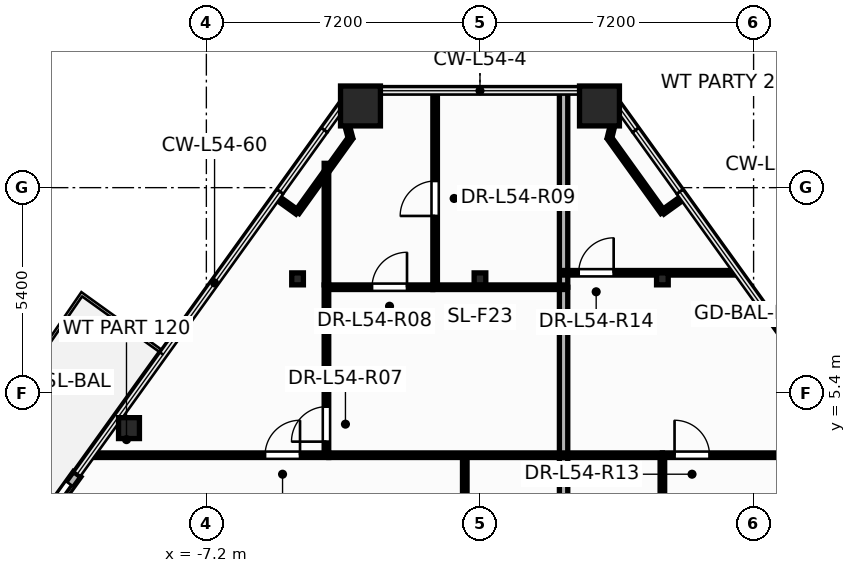
"""IFC4 building model, lengths in metres.
Left out: names, types, materials, properties, quantities, classifications, styles, units other than length and angle.
Written with IfcOpenShell. Run it as: python <this file> out.ifc"""

import sys

from ifc_helpers import new_model, si_unit, direction, frame, frame_2d, origin, origin_2d, place, context, subcontext, project, spatial, rectangle, hollow_rectangle, hollow_circle, i_section, extrude, element, fill, save


model = new_model("IFC4")
c1 = context("Model", 3, precision=1e-05, world=origin(), true_north=direction((0.0, 1.0)))
c2 = subcontext(c1, "Body", "Model", "MODEL_VIEW")
j1 = project(units=[si_unit("LENGTHUNIT", "METRE"), si_unit("PLANEANGLEUNIT", "RADIAN")], contexts=[c1])
p1 = place(None, origin())
s1 = spatial("IfcSite", under=j1, at=p1, CompositionType="ELEMENT")
p2 = place(p1, origin())
s2 = spatial("IfcBuilding", under=s1, at=p2, CompositionType="ELEMENT")
p3 = place(p2, frame((0.0, 0.0, 207.3)))
s3 = spatial("IfcBuildingStorey", under=s2, at=p3, CompositionType="ELEMENT", Elevation=207.3)
for number, where, z_axis, x_axis in (
    (1, (3.145, 12.95, 0.0), (0.0, 0.0, 1.0), (1.0, 0.0, 0.0)),
    (2, (-3.145, 12.95, 0.0), (0.0, 0.0, 1.0), (1.0, 0.0, 0.0)),
):
    element("IfcColumn", number, at=place(p3, frame(where, z_axis=z_axis, x_axis=x_axis)), inside=s3, PredefinedType="COLUMN", context=c2, shape_type="SweptSolid", body=[
        extrude(hollow_rectangle(XDim=1.05, YDim=1.05, WallThickness=0.045, at=origin_2d()), origin(), (0.0, 0.0, 1.0), 3.6),
    ])
p4 = place(p3, frame((-9.236, 4.473, 0.0), z_axis=(0.0, 0.0, 1.0), x_axis=(1.0, 0.0, 0.0)))
e3 = element("IfcColumn", 3, at=p4, inside=s3, PredefinedType="COLUMN", context=c2, shape_type="SweptSolid", body=[
    extrude(hollow_circle(Radius=0.275, WallThickness=0.024, at=origin_2d()), origin(), (0.0, 0.0, 1.0), 3.6),
])
for number, where, z_axis, x_axis in (
    (4, (-4.8, 8.4, 0.0), (0.0, 0.0, 1.0), (1.0, 0.0, 0.0)),
    (5, (0.0, 8.4, 0.0), (0.0, 0.0, 1.0), (1.0, 0.0, 0.0)),
    (6, (4.8, 8.4, 0.0), (0.0, 0.0, 1.0), (1.0, 0.0, 0.0)),
):
    element("IfcColumn", number, at=place(p3, frame(where, z_axis=z_axis, x_axis=x_axis)), inside=s3, PredefinedType="COLUMN", context=c2, shape_type="SweptSolid", body=[
        extrude(i_section(OverallWidth=0.307, OverallDepth=0.314, WebThickness=0.012, FlangeThickness=0.019, at=origin_2d()), origin(), (0.0, 0.0, 1.0), 3.6),
    ])
p5 = place(p3, frame((-10.601, 3.259, -0.015), z_axis=(0.0, 0.0, 1.0), x_axis=(-0.583556118157, -0.812072815061, 0.0)))
e7 = element("IfcWall", 7, at=p5, inside=s3, PredefinedType="STANDARD", context=c2, shape_type="SweptSolid", body=[
    extrude(rectangle(XDim=2.14, YDim=0.24, at=frame_2d((1.07, 0.0))), origin(), (0.0, 0.0, 1.0), 2.802),
])
p6 = place(p5, frame((0.32, 0.0, 0.015)))
e8 = element("IfcOpeningElement", 8, at=p6, cuts=e7, PredefinedType="OPENING", context=c2, shape_type="SweptSolid", body=[
    extrude(rectangle(XDim=1.506, YDim=2.204, at=frame_2d((0.75, 1.102))), frame((0.0, 0.13, 0.0), z_axis=(0.0, -1.0, 0.0), x_axis=(1.0, 0.0, 0.0)), (0.0, 0.0, 1.0), 0.26),
])
p7 = place(p3, frame((-10.241, 3.76, 0.0), z_axis=(0.0, 0.0, 1.0), x_axis=(1.0, 0.0, 0.0)))
e9 = element("IfcWall", 9, at=p7, inside=s3, PredefinedType="PARTITIONING", context=c2, shape_type="SweptSolid", body=[
    extrude(rectangle(XDim=6.261, YDim=0.12, at=frame_2d((3.13, 0.0))), origin(), (0.0, 0.0, 1.0), 2.62),
])
p8 = place(p7, frame((4.586, 0.0, 0.0)))
e10 = element("IfcOpeningElement", 10, at=p8, cuts=e9, PredefinedType="OPENING", context=c2, shape_type="SweptSolid", body=[
    extrude(rectangle(XDim=0.926, YDim=2.104, at=frame_2d((0.46, 1.052))), frame((0.0, 0.07, 0.0), z_axis=(0.0, -1.0, 0.0), x_axis=(1.0, 0.0, 0.0)), (0.0, 0.0, 1.0), 0.14),
])
p9 = place(p3, frame((-1.18, 8.18, 0.0), z_axis=(0.0, 0.0, 1.0), x_axis=(0.0, 1.0, 0.0)))
e11 = element("IfcWall", 11, at=p9, inside=s3, PredefinedType="PARTITIONING", context=c2, shape_type="SweptSolid", body=[
    extrude(rectangle(XDim=5.17, YDim=0.12, at=frame_2d((2.585, 0.0))), origin(), (0.0, 0.0, 1.0), 2.62),
])
p10 = place(p9, frame((1.875, 0.0, 0.0)))
e12 = element("IfcOpeningElement", 12, at=p10, cuts=e11, PredefinedType="OPENING", context=c2, shape_type="SweptSolid", body=[
    extrude(rectangle(XDim=0.926, YDim=2.104, at=frame_2d((0.46, 1.052))), frame((0.0, 0.07, 0.0), z_axis=(0.0, -1.0, 0.0), x_axis=(1.0, 0.0, 0.0)), (0.0, 0.0, 1.0), 0.14),
])
p11 = place(p3, frame((2.2, 8.18, 0.0), z_axis=(0.0, 0.0, 1.0), x_axis=(0.0, 1.0, 0.0)))
e13 = element("IfcWall", 13, at=p11, inside=s3, PredefinedType="PARTITIONING", context=c2, shape_type="SweptSolid", body=[
    extrude(rectangle(XDim=5.17, YDim=0.22, at=frame_2d((2.585, 0.0))), origin(), (0.0, 0.0, 1.0), 2.62),
])
p12 = place(p3, frame((2.2, 8.56, 0.0), z_axis=(0.0, 0.0, 1.0), x_axis=(1.0, 0.0, 0.0)))
e14 = element("IfcWall", 14, at=p12, inside=s3, PredefinedType="PARTITIONING", context=c2, shape_type="SweptSolid", body=[
    extrude(rectangle(XDim=4.592, YDim=0.12, at=frame_2d((2.296, 0.0))), origin(), (0.0, 0.0, 1.0), 2.62),
])
p13 = place(p12, frame((0.398, 0.0, 0.0)))
e15 = element("IfcOpeningElement", 15, at=p13, cuts=e14, PredefinedType="OPENING", context=c2, shape_type="SweptSolid", body=[
    extrude(rectangle(XDim=0.926, YDim=2.104, at=frame_2d((0.46, 1.052))), frame((0.0, 0.07, 0.0), z_axis=(0.0, -1.0, 0.0), x_axis=(1.0, 0.0, 0.0)), (0.0, 0.0, 1.0), 0.14),
])
p14 = place(p3, frame((-4.04, 3.76, 0.0), z_axis=(0.0, 0.0, 1.0), x_axis=(0.0, 1.0, 0.0)))
e16 = element("IfcWall", 16, at=p14, inside=s3, PredefinedType="PARTITIONING", context=c2, shape_type="SweptSolid", body=[
    extrude(rectangle(XDim=4.48, YDim=0.12, at=frame_2d((2.24, 0.0))), origin(), (0.0, 0.0, 1.0), 3.345),
])
p15 = place(p14, frame((0.357, 0.0, 0.0)))
e17 = element("IfcOpeningElement", 17, at=p15, cuts=e16, PredefinedType="OPENING", context=c2, shape_type="SweptSolid", body=[
    extrude(rectangle(XDim=0.926, YDim=2.104, at=frame_2d((0.46, 1.052))), frame((0.0, 0.07, 0.0), z_axis=(0.0, -1.0, 0.0), x_axis=(1.0, 0.0, 0.0)), (0.0, 0.0, 1.0), 0.14),
])
p16 = place(p3, frame((2.2, -2.76, 0.0), z_axis=(0.0, 0.0, 1.0), x_axis=(0.0, 1.0, 0.0)))
e18 = element("IfcWall", 18, at=p16, inside=s3, PredefinedType="PARTITIONING", context=c2, shape_type="SweptSolid", body=[
    extrude(rectangle(XDim=10.94, YDim=0.22, at=frame_2d((5.47, 0.0))), origin(), (0.0, 0.0, 1.0), 2.32),
])
p17 = place(p3, frame((-3.978, 3.76, 0.0), z_axis=(0.0, 0.0, 1.0), x_axis=(1.0, 0.0, 0.0)))
e19 = element("IfcWall", 19, at=p17, inside=s3, PredefinedType="PARTITIONING", context=c2, shape_type="SweptSolid", body=[
    extrude(rectangle(XDim=8.778, YDim=0.12, at=frame_2d((4.389, 0.0))), origin(), (0.0, 0.0, 1.0), 2.32),
])
p18 = place(p3, frame((-0.4, 0.16, 0.0), z_axis=(0.0, 0.0, 1.0), x_axis=(0.0, 1.0, 0.0)))
e20 = element("IfcWall", 20, at=p18, inside=s3, PredefinedType="PARTITIONING", context=c2, shape_type="SweptSolid", body=[
    extrude(rectangle(XDim=3.6, YDim=0.12, at=frame_2d((1.8, 0.0))), origin(), (0.0, 0.0, 1.0), 2.32),
])
p19 = place(p18, frame((0.32, 0.0, 0.0)))
e21 = element("IfcOpeningElement", 21, at=p19, cuts=e20, PredefinedType="OPENING", context=c2, shape_type="SweptSolid", body=[
    extrude(rectangle(XDim=0.926, YDim=2.104, at=frame_2d((0.46, 1.052))), frame((0.0, 0.07, 0.0), z_axis=(0.0, -1.0, 0.0), x_axis=(1.0, 0.0, 0.0)), (0.0, 0.0, 1.0), 0.14),
])
p20 = place(p3, frame((4.8, 0.16, 0.0), z_axis=(0.0, 0.0, 1.0), x_axis=(0.0, 1.0, 0.0)))
e22 = element("IfcWall", 22, at=p20, inside=s3, PredefinedType="PARTITIONING", context=c2, shape_type="SweptSolid", body=[
    extrude(rectangle(XDim=3.6, YDim=0.12, at=frame_2d((1.8, 0.0))), origin(), (0.0, 0.0, 1.0), 2.32),
])
p21 = place(p20, frame((0.36, 0.0, 0.0)))
e23 = element("IfcOpeningElement", 23, at=p21, cuts=e22, PredefinedType="OPENING", context=c2, shape_type="SweptSolid", body=[
    extrude(rectangle(XDim=0.926, YDim=2.104, at=frame_2d((0.46, 1.052))), frame((0.0, 0.07, 0.0), z_axis=(0.0, -1.0, 0.0), x_axis=(1.0, 0.0, 0.0)), (0.0, 0.0, 1.0), 0.14),
])
p22 = place(p3, frame((-1.24, 8.18, 0.0), z_axis=(0.0, 0.0, 1.0), x_axis=(1.0, 0.0, 0.0)))
e24 = element("IfcWall", 24, at=p22, inside=s3, PredefinedType="PARTITIONING", context=c2, shape_type="SweptSolid", body=[
    extrude(rectangle(XDim=3.44, YDim=0.12, at=frame_2d((1.72, 0.0))), origin(), (0.0, 0.0, 1.0), 2.32),
])
p23 = place(p3, frame((4.8, 3.76, 0.0), z_axis=(0.0, 0.0, 1.0), x_axis=(1.0, 0.0, 0.0)))
e25 = element("IfcWall", 25, at=p23, inside=s3, PredefinedType="PARTITIONING", context=c2, shape_type="SweptSolid", body=[
    extrude(rectangle(XDim=3.4, YDim=0.12, at=frame_2d((1.7, 0.0))), origin(), (0.0, 0.0, 1.0), 2.62),
])
p24 = place(p23, frame((0.32, 0.0, 0.0)))
e26 = element("IfcOpeningElement", 26, at=p24, cuts=e25, PredefinedType="OPENING", context=c2, shape_type="SweptSolid", body=[
    extrude(rectangle(XDim=0.926, YDim=2.104, at=frame_2d((0.46, 1.052))), frame((0.0, 0.07, 0.0), z_axis=(0.0, -1.0, 0.0), x_axis=(1.0, 0.0, 0.0)), (0.0, 0.0, 1.0), 0.14),
])
p25 = place(p3, frame((-4.04, 8.242, 0.0), z_axis=(0.0, 0.0, 1.0), x_axis=(0.0, 1.0, 0.0)))
e27 = element("IfcWall", 27, at=p25, inside=s3, PredefinedType="PARTITIONING", context=c2, shape_type="SweptSolid", body=[
    extrude(rectangle(XDim=3.198, YDim=0.12, at=frame_2d((1.599, 0.0))), origin(), (0.0, 0.0, 1.0), 2.62),
])
p26 = place(p3, frame((-4.04, 8.18, 0.0), z_axis=(0.0, 0.0, 1.0), x_axis=(1.0, 0.0, 0.0)))
e28 = element("IfcWall", 28, at=p26, inside=s3, PredefinedType="PARTITIONING", context=c2, shape_type="SweptSolid", body=[
    extrude(rectangle(XDim=2.798, YDim=0.12, at=frame_2d((1.399, 0.0))), origin(), (0.0, 0.0, 1.0), 2.62),
])
p27 = place(p26, frame((1.2, 0.0, 0.0)))
e29 = element("IfcOpeningElement", 29, at=p27, cuts=e28, PredefinedType="OPENING", context=c2, shape_type="SweptSolid", body=[
    extrude(rectangle(XDim=0.926, YDim=2.104, at=frame_2d((0.46, 1.052))), frame((0.0, 0.07, 0.0), z_axis=(0.0, -1.0, 0.0), x_axis=(1.0, 0.0, 0.0)), (0.0, 0.0, 1.0), 0.14),
])
for number, where, z_axis, x_axis in (
    (30, (-3.407, 12.104, 0.0), (0.0, 0.0, 1.0), (-0.584, -0.812, 0.0)),
    (31, (4.808, 10.155, 0.0), (0.0, 0.0, 1.0), (-0.584, 0.812, 0.0)),
):
    element("IfcWall", number, at=place(p3, frame(where, z_axis=z_axis, x_axis=x_axis)), inside=s3, PredefinedType="PARTITIONING", context=c2, shape_type="SweptSolid", body=[
        extrude(rectangle(XDim=2.4, YDim=0.12, at=frame_2d((1.2, 0.0))), origin(), (0.0, 0.0, 1.0), 2.62),
    ])
p28 = place(p3, frame((-3.63, 12.942, 0.0), z_axis=(0.0, 0.0, 1.0), x_axis=(0.256751374208, -0.966477486464, 0.0)))
e32 = element("IfcWall", 32, at=p28, inside=s3, PredefinedType="PARTITIONING", context=c2, shape_type="SweptSolid", body=[
    extrude(rectangle(XDim=0.867, YDim=0.12, at=frame_2d((0.434, 0.0))), origin(), (0.0, 0.0, 1.0), 2.62),
])
p29 = place(p3, frame((3.407, 12.104, 0.0), z_axis=(0.0, 0.0, 1.0), x_axis=(0.237718936872, 0.971333983269, 0.0)))
e33 = element("IfcWall", 33, at=p29, inside=s3, PredefinedType="PARTITIONING", context=c2, shape_type="SweptSolid", body=[
    extrude(rectangle(XDim=0.847, YDim=0.12, at=frame_2d((0.424, 0.0))), origin(), (0.0, 0.0, 1.0), 2.62),
])
for number, where, z_axis, x_axis in (
    (34, (-4.808, 10.155, 0.0), (0.0, 0.0, 1.0), (-0.812, 0.584, 0.0)),
    (35, (5.352, 10.546, 0.0), (0.0, 0.0, 1.0), (-0.812, -0.584, 0.0)),
):
    element("IfcWall", number, at=place(p3, frame(where, z_axis=z_axis, x_axis=x_axis)), inside=s3, PredefinedType="PARTITIONING", context=c2, shape_type="SweptSolid", body=[
        extrude(rectangle(XDim=0.67, YDim=0.12, at=frame_2d((0.335, 0.0))), origin(), (0.0, 0.0, 1.0), 2.787),
    ])
p30 = place(p6, origin())
e36 = element("IfcDoor", 36, at=p30, inside=s3, OperationType="SLIDING_TO_RIGHT", PredefinedType="DOOR", context=c2, shape_type="SweptSolid", body=[
    extrude(rectangle(XDim=1.5, YDim=2.2, at=frame_2d((0.75, 1.1))), frame((0.0, 0.025, 0.0), z_axis=(0.0, -1.0, 0.0), x_axis=(1.0, 0.0, 0.0)), (0.0, 0.0, 1.0), 0.05),
])
fill(e8, e36)
p31 = place(p8, origin())
e37 = element("IfcDoor", 37, at=p31, inside=s3, OperationType="SINGLE_SWING_RIGHT", PredefinedType="DOOR", context=c2, shape_type="SweptSolid", body=[
    extrude(rectangle(XDim=0.92, YDim=2.1, at=frame_2d((0.46, 1.05))), frame((0.0, 0.025, 0.0), z_axis=(0.0, -1.0, 0.0), x_axis=(1.0, 0.0, 0.0)), (0.0, 0.0, 1.0), 0.05),
])
fill(e10, e37)
p32 = place(p15, origin())
e38 = element("IfcDoor", 38, at=p32, inside=s3, OperationType="SINGLE_SWING_LEFT", PredefinedType="DOOR", context=c2, shape_type="SweptSolid", body=[
    extrude(rectangle(XDim=0.92, YDim=2.1, at=frame_2d((0.46, 1.05))), frame((0.0, 0.025, 0.0), z_axis=(0.0, -1.0, 0.0), x_axis=(1.0, 0.0, 0.0)), (0.0, 0.0, 1.0), 0.05),
])
fill(e17, e38)
p33 = place(p27, origin())
e39 = element("IfcDoor", 39, at=p33, inside=s3, OperationType="SINGLE_SWING_RIGHT", PredefinedType="DOOR", context=c2, shape_type="SweptSolid", body=[
    extrude(rectangle(XDim=0.92, YDim=2.1, at=frame_2d((0.46, 1.05))), frame((0.0, 0.025, 0.0), z_axis=(0.0, -1.0, 0.0), x_axis=(1.0, 0.0, 0.0)), (0.0, 0.0, 1.0), 0.05),
])
fill(e29, e39)
p34 = place(p10, origin())
e40 = element("IfcDoor", 40, at=p34, inside=s3, OperationType="SINGLE_SWING_LEFT", PredefinedType="DOOR", context=c2, shape_type="SweptSolid", body=[
    extrude(rectangle(XDim=0.92, YDim=2.1, at=frame_2d((0.46, 1.05))), frame((0.0, 0.025, 0.0), z_axis=(0.0, -1.0, 0.0), x_axis=(1.0, 0.0, 0.0)), (0.0, 0.0, 1.0), 0.05),
])
fill(e12, e40)
p35 = place(p24, origin())
e41 = element("IfcDoor", 41, at=p35, inside=s3, OperationType="SINGLE_SWING_LEFT", PredefinedType="DOOR", context=c2, shape_type="SweptSolid", body=[
    extrude(rectangle(XDim=0.92, YDim=2.1, at=frame_2d((0.46, 1.05))), frame((0.0, 0.025, 0.0), z_axis=(0.0, -1.0, 0.0), x_axis=(1.0, 0.0, 0.0)), (0.0, 0.0, 1.0), 0.05),
])
fill(e26, e41)
p36 = place(p13, origin())
e42 = element("IfcDoor", 42, at=p36, inside=s3, OperationType="SINGLE_SWING_RIGHT", PredefinedType="DOOR", context=c2, shape_type="SweptSolid", body=[
    extrude(rectangle(XDim=0.92, YDim=2.1, at=frame_2d((0.46, 1.05))), frame((0.0, 0.025, 0.0), z_axis=(0.0, -1.0, 0.0), x_axis=(1.0, 0.0, 0.0)), (0.0, 0.0, 1.0), 0.05),
])
fill(e15, e42)
save(model, sys.argv[1])
